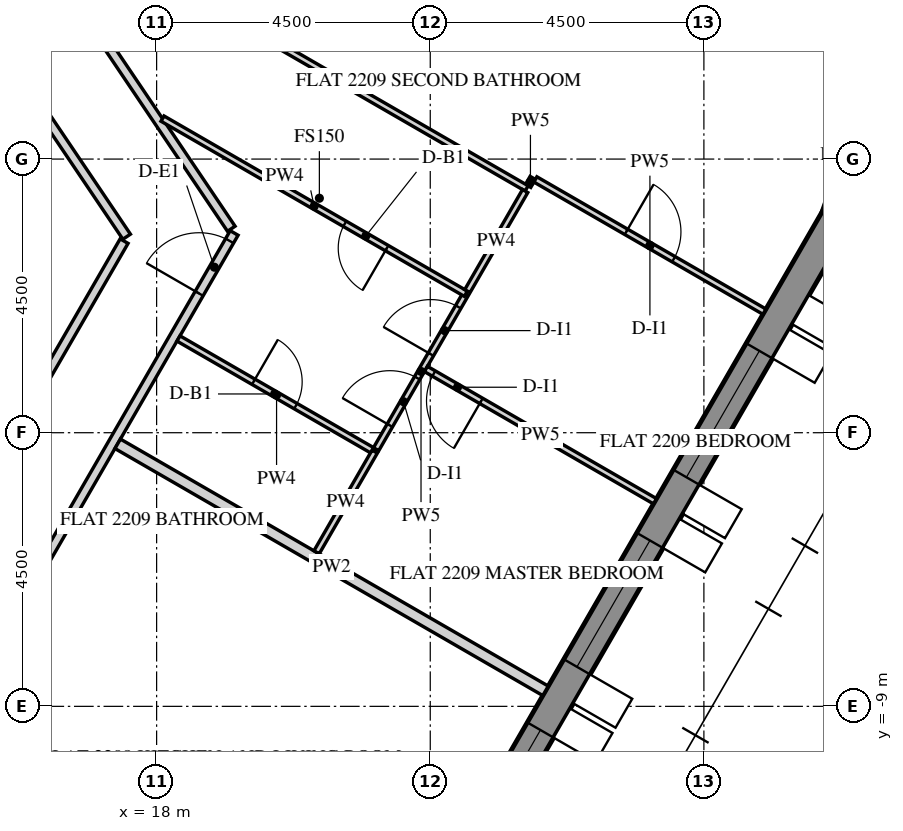
"""IFC4 building model, lengths in metres.
Left out: names, types, materials, properties, quantities, classifications, styles, units other than length and angle.
Written with IfcOpenShell. Run it as: python <this file> out.ifc"""

import sys

from ifc_helpers import new_model, si_unit, direction, frame, frame_2d, origin, place, context, subcontext, project, spatial, polyline, rectangle, outline, extrude, element, fill, save


model = new_model("IFC4")
c1 = context("Model", 3, precision=1e-05, world=origin(), true_north=direction((0.0, 1.0)))
c2 = subcontext(c1, "Body", "Model", "MODEL_VIEW")
j1 = project(units=[si_unit("LENGTHUNIT", "METRE"), si_unit("PLANEANGLEUNIT", "RADIAN")], contexts=[c1])
p1 = place(None, origin())
s1 = spatial("IfcSite", under=j1, at=p1, CompositionType="ELEMENT")
p2 = place(p1, origin())
s2 = spatial("IfcBuilding", under=s1, at=p2, CompositionType="ELEMENT")
p3 = place(p2, frame((0.0, 0.0, 279.6)))
s3 = spatial("IfcBuildingStorey", under=s2, at=p3, CompositionType="ELEMENT", Elevation=279.6)
p4 = place(p3, frame((16.451, -23.005, -0.15), z_axis=(0.0, 0.0, 1.0), x_axis=(0.500003737743, 0.866023245787, 0.0)))
e1 = element("IfcWall", 1, at=p4, inside=s3, PredefinedType="SOLIDWALL", context=c2, shape_type="SweptSolid", body=[
    extrude(outline(polyline([(-0.021, -0.25), (25.468, -0.25), (25.421, 0.25), (0.021, 0.25), (-0.021, -0.25)])), origin(), (0.0, 0.0, 1.0), 3.9),
])
p5 = place(p4, frame((2.522, 0.0, 0.75)))
e2 = element("IfcOpeningElement", 2, at=p5, cuts=e1, PredefinedType="OPENING", context=c2, shape_type="SweptSolid", body=[
    extrude(rectangle(XDim=2.4, YDim=2.7, at=frame_2d((1.2, 1.35))), frame((0.0, 0.26, 0.0), z_axis=(0.0, -1.0, 0.0), x_axis=(1.0, 0.0, 0.0)), (0.0, 0.0, 1.0), 0.52),
])
p6 = place(p4, frame((6.122, 0.0, 0.75)))
e3 = element("IfcOpeningElement", 3, at=p6, cuts=e1, PredefinedType="OPENING", context=c2, shape_type="SweptSolid", body=[
    extrude(rectangle(XDim=2.4, YDim=2.7, at=frame_2d((1.2, 1.35))), frame((0.0, 0.26, 0.0), z_axis=(0.0, -1.0, 0.0), x_axis=(1.0, 0.0, 0.0)), (0.0, 0.0, 1.0), 0.52),
])
p7 = place(p4, frame((9.722, 0.0, 0.75)))
e4 = element("IfcOpeningElement", 4, at=p7, cuts=e1, PredefinedType="OPENING", context=c2, shape_type="SweptSolid", body=[
    extrude(rectangle(XDim=2.4, YDim=2.7, at=frame_2d((1.2, 1.35))), frame((0.0, 0.26, 0.0), z_axis=(0.0, -1.0, 0.0), x_axis=(1.0, 0.0, 0.0)), (0.0, 0.0, 1.0), 0.52),
])
p8 = place(p4, frame((13.323, 0.0, 0.75)))
e5 = element("IfcOpeningElement", 5, at=p8, cuts=e1, PredefinedType="OPENING", context=c2, shape_type="SweptSolid", body=[
    extrude(rectangle(XDim=2.4, YDim=2.7, at=frame_2d((1.2, 1.35))), frame((0.0, 0.26, 0.0), z_axis=(0.0, -1.0, 0.0), x_axis=(1.0, 0.0, 0.0)), (0.0, 0.0, 1.0), 0.52),
])
p9 = place(p4, frame((16.922, 0.0, 0.75)))
e6 = element("IfcOpeningElement", 6, at=p9, cuts=e1, PredefinedType="OPENING", context=c2, shape_type="SweptSolid", body=[
    extrude(rectangle(XDim=2.4, YDim=2.7, at=frame_2d((1.2, 1.35))), frame((0.0, 0.26, 0.0), z_axis=(0.0, -1.0, 0.0), x_axis=(1.0, 0.0, 0.0)), (0.0, 0.0, 1.0), 0.52),
])
p10 = place(p4, frame((20.522, 0.0, 0.75)))
e7 = element("IfcOpeningElement", 7, at=p10, cuts=e1, PredefinedType="OPENING", context=c2, shape_type="SweptSolid", body=[
    extrude(rectangle(XDim=2.4, YDim=2.7, at=frame_2d((1.2, 1.35))), frame((0.0, 0.26, 0.0), z_axis=(0.0, -1.0, 0.0), x_axis=(1.0, 0.0, 0.0)), (0.0, 0.0, 1.0), 0.52),
])
p11 = place(p3, frame((29.174, -0.97, -0.15), z_axis=(0.0, 0.0, 1.0), x_axis=(0.330961348063, 0.943644311215, 0.0)))
e8 = element("IfcWall", 8, at=p11, inside=s3, PredefinedType="SOLIDWALL", context=c2, shape_type="SweptSolid", body=[
    extrude(outline(polyline([(-0.023, -0.25), (1.435, -0.25), (1.341, 0.25), (0.023, 0.25), (-0.023, -0.25)])), origin(), (0.0, 0.0, 1.0), 3.9),
])
p12 = place(p3, frame((29.585, 1.728, -0.15), z_axis=(0.0, 0.0, 1.0), x_axis=(-0.396146339195, 0.918187387162, 0.0)))
e9 = element("IfcWall", 9, at=p12, inside=s3, PredefinedType="SOLIDWALL", context=c2, shape_type="SweptSolid", body=[
    extrude(outline(polyline([(-0.047, -0.25), (1.412, -0.25), (1.365, 0.25), (0.047, 0.25), (-0.047, -0.25)])), origin(), (0.0, 0.0, 1.0), 3.9),
])
p13 = place(p3, frame((11.627, -14.462, 0.0), z_axis=(0.0, 0.0, 1.0), x_axis=(0.499994634027, 0.866028501808, 0.0)))
e10 = element("IfcWall", 10, at=p13, inside=s3, PredefinedType="PARTITIONING", context=c2, shape_type="SweptSolid", body=[
    extrude(rectangle(XDim=15.296, YDim=0.15, at=frame_2d((7.648, 0.0))), origin(), (0.0, 0.0, 1.0), 2.988),
])
p14 = place(p13, frame((0.525, 0.0, 0.0)))
e11 = element("IfcOpeningElement", 11, at=p14, cuts=e10, PredefinedType="OPENING", context=c2, shape_type="SweptSolid", body=[
    extrude(rectangle(XDim=1.0, YDim=2.1, at=frame_2d((0.5, 1.05))), frame((0.0, 0.085, 0.0), z_axis=(0.0, -1.0, 0.0), x_axis=(1.0, 0.0, 0.0)), (0.0, 0.0, 1.0), 0.17),
])
p15 = place(p13, frame((14.146, 0.0, 0.0)))
e12 = element("IfcOpeningElement", 12, at=p15, cuts=e10, PredefinedType="OPENING", context=c2, shape_type="SweptSolid", body=[
    extrude(rectangle(XDim=1.0, YDim=2.1, at=frame_2d((0.5, 1.05))), frame((0.0, 0.085, 0.0), z_axis=(0.0, -1.0, 0.0), x_axis=(1.0, 0.0, 0.0)), (0.0, 0.0, 1.0), 0.17),
])
p16 = place(p3, frame((19.228, -1.146, 0.0), z_axis=(0.0, 0.0, 1.0), x_axis=(-0.559173750718, 0.829050490928, 0.0)))
e13 = element("IfcWall", 13, at=p16, inside=s3, PredefinedType="PARTITIONING", context=c2, shape_type="SweptSolid", body=[
    extrude(rectangle(XDim=17.273, YDim=0.15, at=frame_2d((8.637, 0.0))), origin(), (0.0, 0.0, 1.0), 2.988),
])
p17 = place(p16, frame((9.478, 0.0, 0.0)))
e14 = element("IfcOpeningElement", 14, at=p17, cuts=e13, PredefinedType="OPENING", context=c2, shape_type="SweptSolid", body=[
    extrude(rectangle(XDim=1.0, YDim=2.1, at=frame_2d((0.5, 1.05))), frame((0.0, 0.085, 0.0), z_axis=(0.0, -1.0, 0.0), x_axis=(1.0, 0.0, 0.0)), (0.0, 0.0, 1.0), 0.17),
])
p18 = place(p3, frame((12.627, 5.958, 0.0), z_axis=(0.0, 0.0, 1.0), x_axis=(0.559185493191, -0.829042570804, 0.0)))
e15 = element("IfcWall", 15, at=p18, inside=s3, PredefinedType="PARTITIONING", context=c2, shape_type="SweptSolid", body=[
    extrude(rectangle(XDim=8.727, YDim=0.15, at=frame_2d((4.363, 0.0))), origin(), (0.0, 0.0, 1.0), 2.988),
])
p19 = place(p18, frame((3.913, 0.0, 0.0)))
e16 = element("IfcOpeningElement", 16, at=p19, cuts=e15, PredefinedType="OPENING", context=c2, shape_type="SweptSolid", body=[
    extrude(rectangle(XDim=0.9, YDim=2.1, at=frame_2d((0.45, 1.05))), frame((0.0, 0.085, 0.0), z_axis=(0.0, -1.0, 0.0), x_axis=(1.0, 0.0, 0.0)), (0.0, 0.0, 1.0), 0.17),
])
p20 = place(p3, frame((17.465, -1.349, 0.0), z_axis=(0.0, 0.0, 1.0), x_axis=(-0.500001610943, -0.866024473704, 0.0)))
e17 = element("IfcWall", 17, at=p20, inside=s3, PredefinedType="PARTITIONING", context=c2, shape_type="SweptSolid", body=[
    extrude(rectangle(XDim=6.485, YDim=0.15, at=frame_2d((3.243, 0.0))), origin(), (0.0, 0.0, 1.0), 2.988),
])
p21 = place(p3, frame((24.396, -8.745, 0.0), z_axis=(0.0, 0.0, 1.0), x_axis=(-0.866022959057, 0.500004234368, 0.0)))
e18 = element("IfcWall", 18, at=p21, inside=s3, PredefinedType="PARTITIONING", context=c2, shape_type="SweptSolid", body=[
    extrude(rectangle(XDim=8.125, YDim=0.18, at=frame_2d((4.062, 0.0))), origin(), (0.0, 0.0, 1.0), 2.988),
])
p22 = place(p3, frame((24.11, -0.441, 0.0), z_axis=(0.0, 0.0, 1.0), x_axis=(0.499074005857, 0.866559367082, 0.0)))
e19 = element("IfcWall", 19, at=p22, inside=s3, PredefinedType="PARTITIONING", context=c2, shape_type="SweptSolid", body=[
    extrude(rectangle(XDim=0.152, YDim=0.1, at=frame_2d((0.076, 0.0))), origin(), (0.0, 0.0, 1.0), 2.988),
])
p23 = place(p3, frame((24.229, -0.334, 0.0), z_axis=(0.0, 0.0, 1.0), x_axis=(0.866027639635, -0.499996127374, 0.0)))
e20 = element("IfcWall", 20, at=p23, inside=s3, PredefinedType="PARTITIONING", context=c2, shape_type="SweptSolid", body=[
    extrude(rectangle(XDim=4.35, YDim=0.1, at=frame_2d((2.175, 0.0))), origin(), (0.0, 0.0, 1.0), 2.988),
])
p24 = place(p23, frame((1.725, 0.0, 0.0)))
e21 = element("IfcOpeningElement", 21, at=p24, cuts=e20, PredefinedType="OPENING", context=c2, shape_type="SweptSolid", body=[
    extrude(rectangle(XDim=0.9, YDim=2.1, at=frame_2d((0.45, 1.05))), frame((0.0, 0.06, 0.0), z_axis=(0.0, -1.0, 0.0), x_axis=(1.0, 0.0, 0.0)), (0.0, 0.0, 1.0), 0.12),
])
p25 = place(p3, frame((15.545, 4.448, 0.0), z_axis=(0.0, 0.0, 1.0), x_axis=(0.866022320763, -0.500005339912, 0.0)))
e22 = element("IfcWall", 22, at=p25, inside=s3, PredefinedType="PARTITIONING", context=c2, shape_type="SweptSolid", body=[
    extrude(rectangle(XDim=9.861, YDim=0.1, at=frame_2d((4.931, 0.0))), origin(), (0.0, 0.0, 1.0), 2.988),
])
p26 = place(p3, frame((18.36, -2.95, 0.0), z_axis=(0.0, 0.0, 1.0), x_axis=(0.866012039196, -0.500023147432, 0.0)))
e23 = element("IfcWall", 23, at=p26, inside=s3, PredefinedType="PARTITIONING", context=c2, shape_type="SweptSolid", body=[
    extrude(rectangle(XDim=3.725, YDim=0.1, at=frame_2d((1.862, 0.0))), origin(), (0.0, 0.0, 1.0), 2.988),
])
p27 = place(p26, frame((1.425, 0.0, 0.0)))
e24 = element("IfcOpeningElement", 24, at=p27, cuts=e23, PredefinedType="OPENING", context=c2, shape_type="SweptSolid", body=[
    extrude(rectangle(XDim=0.8, YDim=2.1, at=frame_2d((0.4, 1.05))), frame((0.0, 0.06, 0.0), z_axis=(0.0, -1.0, 0.0), x_axis=(1.0, 0.0, 0.0)), (0.0, 0.0, 1.0), 0.12),
])
p28 = place(p3, frame((21.61, -4.771, 0.0), z_axis=(0.0, 0.0, 1.0), x_axis=(0.499934698534, 0.866063102321, 0.0)))
e25 = element("IfcWall", 25, at=p28, inside=s3, PredefinedType="PARTITIONING", context=c2, shape_type="SweptSolid", body=[
    extrude(rectangle(XDim=2.954, YDim=0.1, at=frame_2d((1.477, 0.0))), origin(), (0.0, 0.0, 1.0), 2.988),
])
p29 = place(p28, frame((0.452, 0.0, 0.0)))
e26 = element("IfcOpeningElement", 26, at=p29, cuts=e25, PredefinedType="OPENING", context=c2, shape_type="SweptSolid", body=[
    extrude(rectangle(XDim=0.9, YDim=2.1, at=frame_2d((0.45, 1.05))), frame((0.0, 0.06, 0.0), z_axis=(0.0, -1.0, 0.0), x_axis=(1.0, 0.0, 0.0)), (0.0, 0.0, 1.0), 0.12),
])
p30 = place(p28, frame((1.802, 0.0, 0.0)))
e27 = element("IfcOpeningElement", 27, at=p30, cuts=e25, PredefinedType="OPENING", context=c2, shape_type="SweptSolid", body=[
    extrude(rectangle(XDim=0.9, YDim=2.1, at=frame_2d((0.45, 1.05))), frame((0.0, 0.06, 0.0), z_axis=(0.0, -1.0, 0.0), x_axis=(1.0, 0.0, 0.0)), (0.0, 0.0, 1.0), 0.12),
])
p31 = place(p3, frame((23.085, -2.215, 0.0), z_axis=(0.0, 0.0, 1.0), x_axis=(-0.866017611601, 0.500013496215, 0.0)))
e28 = element("IfcWall", 28, at=p31, inside=s3, PredefinedType="PARTITIONING", context=c2, shape_type="SweptSolid", body=[
    extrude(rectangle(XDim=5.76, YDim=0.1, at=frame_2d((2.88, 0.0))), origin(), (0.0, 0.0, 1.0), 2.988),
])
p32 = place(p31, frame((1.5, 0.0, 0.0)))
e29 = element("IfcOpeningElement", 29, at=p32, cuts=e28, PredefinedType="OPENING", context=c2, shape_type="SweptSolid", body=[
    extrude(rectangle(XDim=0.8, YDim=2.1, at=frame_2d((0.4, 1.05))), frame((0.0, 0.06, 0.0), z_axis=(0.0, -1.0, 0.0), x_axis=(1.0, 0.0, 0.0)), (0.0, 0.0, 1.0), 0.12),
])
p33 = place(p3, frame((20.631, -6.467, 0.0), z_axis=(0.0, 0.0, 1.0), x_axis=(0.49994353734, 0.866058000062, 0.0)))
e30 = element("IfcWall", 30, at=p33, inside=s3, PredefinedType="PARTITIONING", context=c2, shape_type="SweptSolid", body=[
    extrude(rectangle(XDim=1.912, YDim=0.1, at=frame_2d((0.956, 0.0))), origin(), (0.0, 0.0, 1.0), 2.988),
])
p34 = place(p3, frame((26.196, -5.627, 0.0), z_axis=(0.0, 0.0, 1.0), x_axis=(-0.866013608182, 0.500020430026, 0.0)))
e31 = element("IfcWall", 31, at=p34, inside=s3, PredefinedType="PARTITIONING", context=c2, shape_type="SweptSolid", body=[
    extrude(rectangle(XDim=4.35, YDim=0.1, at=frame_2d((2.175, 0.0))), origin(), (0.0, 0.0, 1.0), 2.988),
])
p35 = place(p34, frame((3.3, 0.0, 0.0)))
e32 = element("IfcOpeningElement", 32, at=p35, cuts=e31, PredefinedType="OPENING", context=c2, shape_type="SweptSolid", body=[
    extrude(rectangle(XDim=0.9, YDim=2.1, at=frame_2d((0.45, 1.05))), frame((0.0, 0.06, 0.0), z_axis=(0.0, -1.0, 0.0), x_axis=(1.0, 0.0, 0.0)), (0.0, 0.0, 1.0), 0.12),
])
p36 = place(p3, frame((24.061, -0.526, 0.0), z_axis=(0.0, 0.0, 1.0), x_axis=(-0.499967155389, -0.866044365799, 0.0)))
e33 = element("IfcWall", 33, at=p36, inside=s3, PredefinedType="PARTITIONING", context=c2, shape_type="SweptSolid", body=[
    extrude(rectangle(XDim=1.9, YDim=0.1, at=frame_2d((0.95, 0.0))), origin(), (0.0, 0.0, 1.0), 2.988),
])
p37 = place(p8, frame((0.0, 0.18, 0.0)))
e34 = element("IfcWindow", 34, at=p37, inside=s3, PartitioningType="DOUBLE_PANEL_VERTICAL", PredefinedType="WINDOW", context=c2, shape_type="SweptSolid", body=[
    extrude(rectangle(XDim=2.4, YDim=2.7, at=frame_2d((1.2, 1.35))), frame((0.0, 0.03, 0.0), z_axis=(0.0, -1.0, 0.0), x_axis=(1.0, 0.0, 0.0)), (0.0, 0.0, 1.0), 0.06),
])
fill(e5, e34)
p38 = place(p9, frame((0.0, 0.18, 0.0)))
e35 = element("IfcWindow", 35, at=p38, inside=s3, PartitioningType="DOUBLE_PANEL_VERTICAL", PredefinedType="WINDOW", context=c2, shape_type="SweptSolid", body=[
    extrude(rectangle(XDim=2.4, YDim=2.7, at=frame_2d((1.2, 1.35))), frame((0.0, 0.03, 0.0), z_axis=(0.0, -1.0, 0.0), x_axis=(1.0, 0.0, 0.0)), (0.0, 0.0, 1.0), 0.06),
])
fill(e6, e35)
p39 = place(p10, frame((0.0, 0.18, 0.0)))
e36 = element("IfcWindow", 36, at=p39, inside=s3, PartitioningType="DOUBLE_PANEL_VERTICAL", PredefinedType="WINDOW", context=c2, shape_type="SweptSolid", body=[
    extrude(rectangle(XDim=2.4, YDim=2.7, at=frame_2d((1.2, 1.35))), frame((0.0, 0.03, 0.0), z_axis=(0.0, -1.0, 0.0), x_axis=(1.0, 0.0, 0.0)), (0.0, 0.0, 1.0), 0.06),
])
fill(e7, e36)
p40 = place(p15, origin())
e37 = element("IfcDoor", 37, at=p40, inside=s3, OperationType="SINGLE_SWING_LEFT", PredefinedType="DOOR", context=c2, shape_type="SweptSolid", body=[
    extrude(rectangle(XDim=1.0, YDim=2.1, at=frame_2d((0.5, 1.05))), frame((0.0, 0.025, 0.0), z_axis=(0.0, -1.0, 0.0), x_axis=(1.0, 0.0, 0.0)), (0.0, 0.0, 1.0), 0.05),
])
fill(e12, e37)
p41 = place(p27, origin())
e38 = element("IfcDoor", 38, at=p41, inside=s3, OperationType="SINGLE_SWING_RIGHT", PredefinedType="DOOR", context=c2, shape_type="SweptSolid", body=[
    extrude(rectangle(XDim=0.8, YDim=2.1, at=frame_2d((0.4, 1.05))), frame((0.0, 0.025, 0.0), z_axis=(0.0, -1.0, 0.0), x_axis=(1.0, 0.0, 0.0)), (0.0, 0.0, 1.0), 0.05),
])
fill(e24, e38)
p42 = place(p29, origin())
e39 = element("IfcDoor", 39, at=p42, inside=s3, OperationType="SINGLE_SWING_LEFT", PredefinedType="DOOR", context=c2, shape_type="SweptSolid", body=[
    extrude(rectangle(XDim=0.9, YDim=2.1, at=frame_2d((0.45, 1.05))), frame((0.0, 0.025, 0.0), z_axis=(0.0, -1.0, 0.0), x_axis=(1.0, 0.0, 0.0)), (0.0, 0.0, 1.0), 0.05),
])
fill(e26, e39)
p43 = place(p35, origin())
e40 = element("IfcDoor", 40, at=p43, inside=s3, OperationType="SINGLE_SWING_RIGHT", PredefinedType="DOOR", context=c2, shape_type="SweptSolid", body=[
    extrude(rectangle(XDim=0.9, YDim=2.1, at=frame_2d((0.45, 1.05))), frame((0.0, 0.025, 0.0), z_axis=(0.0, -1.0, 0.0), x_axis=(1.0, 0.0, 0.0)), (0.0, 0.0, 1.0), 0.05),
])
fill(e32, e40)
p44 = place(p30, origin())
e41 = element("IfcDoor", 41, at=p44, inside=s3, OperationType="SINGLE_SWING_LEFT", PredefinedType="DOOR", context=c2, shape_type="SweptSolid", body=[
    extrude(rectangle(XDim=0.9, YDim=2.1, at=frame_2d((0.45, 1.05))), frame((0.0, 0.025, 0.0), z_axis=(0.0, -1.0, 0.0), x_axis=(1.0, 0.0, 0.0)), (0.0, 0.0, 1.0), 0.05),
])
fill(e27, e41)
p45 = place(p32, origin())
e42 = element("IfcDoor", 42, at=p45, inside=s3, OperationType="SINGLE_SWING_RIGHT", PredefinedType="DOOR", context=c2, shape_type="SweptSolid", body=[
    extrude(rectangle(XDim=0.8, YDim=2.1, at=frame_2d((0.4, 1.05))), frame((0.0, 0.025, 0.0), z_axis=(0.0, -1.0, 0.0), x_axis=(1.0, 0.0, 0.0)), (0.0, 0.0, 1.0), 0.05),
])
fill(e29, e42)
p46 = place(p24, origin())
e43 = element("IfcDoor", 43, at=p46, inside=s3, OperationType="SINGLE_SWING_RIGHT", PredefinedType="DOOR", context=c2, shape_type="SweptSolid", body=[
    extrude(rectangle(XDim=0.9, YDim=2.1, at=frame_2d((0.45, 1.05))), frame((0.0, 0.025, 0.0), z_axis=(0.0, -1.0, 0.0), x_axis=(1.0, 0.0, 0.0)), (0.0, 0.0, 1.0), 0.05),
])
fill(e21, e43)
save(model, sys.argv[1])
